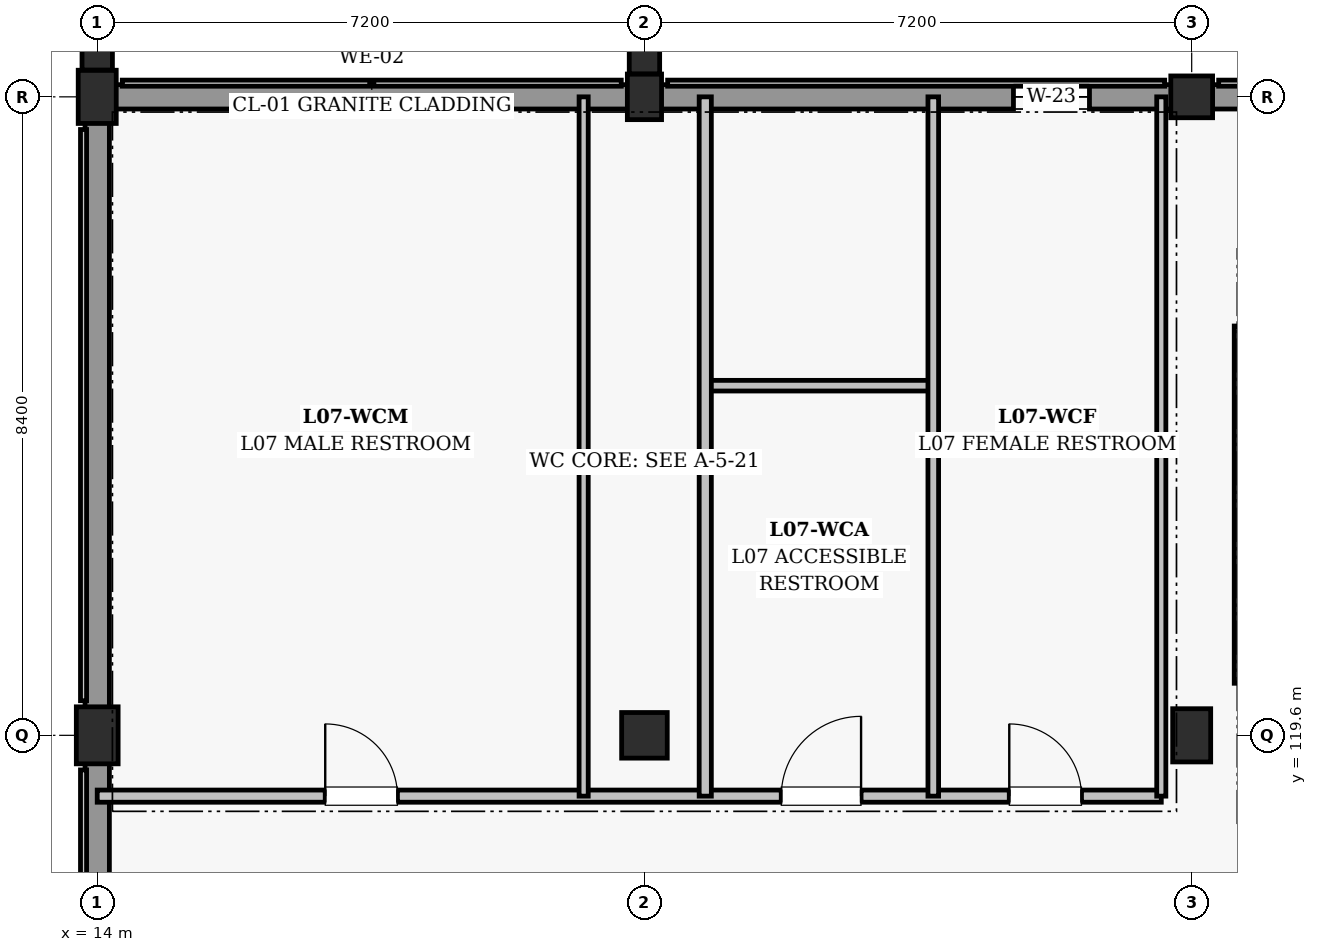
"""IFC4 building model, lengths in metres.
Left out: names, types, materials, properties, quantities, classifications, styles, units other than length and angle.
Written with IfcOpenShell. Run it as: python <this file> out.ifc"""

import sys

from ifc_helpers import new_model, si_unit, direction, frame, frame_2d, origin, origin_2d, place, context, subcontext, project, spatial, rectangle, extrude, element, fill, save


model = new_model("IFC4")
c1 = context("Model", 3, precision=1e-05, world=origin(), true_north=direction((0.0, 1.0)))
c2 = subcontext(c1, "Body", "Model", "MODEL_VIEW")
j1 = project(units=[si_unit("LENGTHUNIT", "METRE"), si_unit("PLANEANGLEUNIT", "RADIAN")], contexts=[c1])
p1 = place(None, origin())
s1 = spatial("IfcSite", under=j1, at=p1, CompositionType="ELEMENT")
p2 = place(p1, origin())
s2 = spatial("IfcBuilding", under=s1, at=p2, CompositionType="ELEMENT")
p3 = place(p2, frame((0.0, 0.0, 32.4)))
s3 = spatial("IfcBuildingStorey", under=s2, at=p3, CompositionType="ELEMENT", Elevation=32.4)
p4 = place(p3, frame((14.0, 119.6, 0.0), z_axis=(0.0, 0.0, 1.0), x_axis=(1.0, 0.0, 0.0)))
e1 = element("IfcColumn", 1, at=p4, inside=s3, PredefinedType="COLUMN", context=c2, shape_type="SweptSolid", body=[
    extrude(rectangle(XDim=0.55, YDim=0.75, at=origin_2d()), origin(), (0.0, 0.0, 1.0), 4.5),
])
p5 = place(p3, frame((14.0, 128.0, 0.0), z_axis=(0.0, 0.0, 1.0), x_axis=(1.0, 0.0, 0.0)))
e2 = element("IfcColumn", 2, at=p5, inside=s3, PredefinedType="COLUMN", context=c2, shape_type="SweptSolid", body=[
    extrude(rectangle(XDim=0.5, YDim=0.7, at=origin_2d()), origin(), (0.0, 0.0, 1.0), 4.5),
])
p6 = place(p3, frame((21.2, 119.6, 0.0), z_axis=(0.0, 0.0, 1.0), x_axis=(1.0, 0.0, 0.0)))
e3 = element("IfcColumn", 3, at=p6, inside=s3, PredefinedType="COLUMN", context=c2, shape_type="SweptSolid", body=[
    extrude(rectangle(XDim=0.6, YDim=0.6, at=origin_2d()), origin(), (0.0, 0.0, 1.0), 4.5),
])
p7 = place(p3, frame((21.2, 128.0, 0.0), z_axis=(0.0, 0.0, 1.0), x_axis=(1.0, 0.0, 0.0)))
e4 = element("IfcColumn", 4, at=p7, inside=s3, PredefinedType="COLUMN", context=c2, shape_type="SweptSolid", body=[
    extrude(rectangle(XDim=0.45, YDim=0.6, at=origin_2d()), origin(), (0.0, 0.0, 1.0), 4.5),
])
p8 = place(p3, frame((28.4, 119.6, 0.0), z_axis=(0.0, 0.0, 1.0), x_axis=(1.0, 0.0, 0.0)))
e5 = element("IfcColumn", 5, at=p8, inside=s3, PredefinedType="COLUMN", context=c2, shape_type="SweptSolid", body=[
    extrude(rectangle(XDim=0.5, YDim=0.7, at=origin_2d()), origin(), (0.0, 0.0, 1.0), 4.5),
])
p9 = place(p3, frame((28.4, 128.0, 0.0), z_axis=(0.0, 0.0, 1.0), x_axis=(1.0, 0.0, 0.0)))
e6 = element("IfcColumn", 6, at=p9, inside=s3, PredefinedType="COLUMN", context=c2, shape_type="SweptSolid", body=[
    extrude(rectangle(XDim=0.55, YDim=0.55, at=origin_2d()), origin(), (0.0, 0.0, 1.0), 4.5),
])
for number, where, z_axis, x_axis in (
    (7, (14.0, 128.653, 0.0), (0.0, 0.0, 1.0), (1.0, 0.0, 0.0)),
    (8, (21.2, 128.603, 0.0), (0.0, 0.0, 1.0), (1.0, 0.0, 0.0)),
):
    element("IfcColumn", number, at=place(p3, frame(where, z_axis=z_axis, x_axis=x_axis)), inside=s3, PredefinedType="PILASTER", context=c2, shape_type="SweptSolid", body=[
        extrude(rectangle(XDim=0.4, YDim=0.6, at=origin_2d()), origin(), (0.0, 0.0, 1.0), 4.5),
    ])
p10 = place(p3, frame((14.23, 128.0, 0.0), z_axis=(0.0, 0.0, 1.0), x_axis=(1.0, 0.0, 0.0)))
e9 = element("IfcWall", 9, at=p10, inside=s3, PredefinedType="SOLIDWALL", context=c2, shape_type="SweptSolid", body=[
    extrude(rectangle(XDim=6.765, YDim=0.32, at=frame_2d((3.383, 0.0))), origin(), (0.0, 0.0, 1.0), 3.305),
])
p11 = place(p3, frame((21.405, 128.0, 0.0), z_axis=(0.0, 0.0, 1.0), x_axis=(1.0, 0.0, 0.0)))
e10 = element("IfcWall", 10, at=p11, inside=s3, PredefinedType="SOLIDWALL", context=c2, shape_type="SweptSolid", body=[
    extrude(rectangle(XDim=6.74, YDim=0.32, at=frame_2d((3.37, 0.0))), origin(), (0.0, 0.0, 1.0), 3.305),
])
p12 = place(p11, frame((4.65, 0.0, 1.85)))
e11 = element("IfcOpeningElement", 11, at=p12, cuts=e10, PredefinedType="OPENING", context=c2, shape_type="SweptSolid", body=[
    extrude(rectangle(XDim=1.0, YDim=0.95, at=frame_2d((0.5, 0.475))), frame((0.0, 0.17, 0.0), z_axis=(0.0, -1.0, 0.0), x_axis=(1.0, 0.0, 0.0)), (0.0, 0.0, 1.0), 0.34),
])
p13 = place(p3, frame((28.655, 128.0, 0.0), z_axis=(0.0, 0.0, 1.0), x_axis=(1.0, 0.0, 0.0)))
e12 = element("IfcWall", 12, at=p13, inside=s3, PredefinedType="SOLIDWALL", context=c2, shape_type="SweptSolid", body=[
    extrude(rectangle(XDim=6.69, YDim=0.32, at=frame_2d((3.345, 0.0))), origin(), (0.0, 0.0, 1.0), 3.355),
])
p14 = place(p3, frame((14.0, 111.48, 0.0), z_axis=(0.0, 0.0, 1.0), x_axis=(0.0, 1.0, 0.0)))
e13 = element("IfcWall", 13, at=p14, inside=s3, PredefinedType="SOLIDWALL", context=c2, shape_type="SweptSolid", body=[
    extrude(rectangle(XDim=7.765, YDim=0.32, at=frame_2d((3.883, 0.0))), origin(), (0.0, 0.0, 1.0), 3.405),
])
p15 = place(p3, frame((14.0, 119.955, 0.0), z_axis=(0.0, 0.0, 1.0), x_axis=(0.0, 1.0, 0.0)))
e14 = element("IfcWall", 14, at=p15, inside=s3, PredefinedType="SOLIDWALL", context=c2, shape_type="SweptSolid", body=[
    extrude(rectangle(XDim=7.715, YDim=0.32, at=frame_2d((3.857, 0.0))), origin(), (0.0, 0.0, 1.0), 3.405),
])
p16 = place(p3, frame((29.085, 124.985, 0.0), z_axis=(0.0, 0.0, 1.0), x_axis=(0.0, -1.0, 0.0)))
e15 = element("IfcWall", 15, at=p16, inside=s3, PredefinedType="SHEAR", context=c2, shape_type="SweptSolid", body=[
    extrude(rectangle(XDim=4.7, YDim=0.25, at=frame_2d((2.35, 0.0))), origin(), (0.0, 0.0, 1.0), 4.175),
])
p17 = place(p3, frame((14.0, 118.8, 0.0), z_axis=(0.0, 0.0, 1.0), x_axis=(1.0, 0.0, 0.0)))
e16 = element("IfcWall", 16, at=p17, inside=s3, PredefinedType="PARTITIONING", context=c2, shape_type="SweptSolid", body=[
    extrude(rectangle(XDim=14.0, YDim=0.16, at=frame_2d((7.0, 0.0))), origin(), (0.0, 0.0, 1.0), 3.36),
])
p18 = place(p17, frame((3.0, 0.0, 0.0)))
e17 = element("IfcOpeningElement", 17, at=p18, cuts=e16, PredefinedType="OPENING", context=c2, shape_type="SweptSolid", body=[
    extrude(rectangle(XDim=0.95, YDim=2.15, at=frame_2d((0.475, 1.075))), frame((0.0, 0.09, 0.0), z_axis=(0.0, -1.0, 0.0), x_axis=(1.0, 0.0, 0.0)), (0.0, 0.0, 1.0), 0.18),
])
p19 = place(p17, frame((9.0, 0.0, 0.0)))
e18 = element("IfcOpeningElement", 18, at=p19, cuts=e16, PredefinedType="OPENING", context=c2, shape_type="SweptSolid", body=[
    extrude(rectangle(XDim=1.05, YDim=2.15, at=frame_2d((0.525, 1.075))), frame((0.0, 0.09, 0.0), z_axis=(0.0, -1.0, 0.0), x_axis=(1.0, 0.0, 0.0)), (0.0, 0.0, 1.0), 0.18),
])
p20 = place(p17, frame((12.0, 0.0, 0.0)))
e19 = element("IfcOpeningElement", 19, at=p20, cuts=e16, PredefinedType="OPENING", context=c2, shape_type="SweptSolid", body=[
    extrude(rectangle(XDim=0.95, YDim=2.15, at=frame_2d((0.475, 1.075))), frame((0.0, 0.09, 0.0), z_axis=(0.0, -1.0, 0.0), x_axis=(1.0, 0.0, 0.0)), (0.0, 0.0, 1.0), 0.18),
])
p21 = place(p3, frame((22.0, 124.2, 0.0), z_axis=(0.0, 0.0, 1.0), x_axis=(1.0, 0.0, 0.0)))
e20 = element("IfcWall", 20, at=p21, inside=s3, PredefinedType="PARTITIONING", context=c2, shape_type="SweptSolid", body=[
    extrude(rectangle(XDim=3.0, YDim=0.14, at=frame_2d((1.5, 0.0))), origin(), (0.0, 0.0, 1.0), 3.56),
])
p22 = place(p3, frame((20.4, 118.8, 0.0), z_axis=(0.0, 0.0, 1.0), x_axis=(0.0, 1.0, 0.0)))
e21 = element("IfcWall", 21, at=p22, inside=s3, PredefinedType="PARTITIONING", context=c2, shape_type="SweptSolid", body=[
    extrude(rectangle(XDim=9.2, YDim=0.12, at=frame_2d((4.6, 0.0))), origin(), (0.0, 0.0, 1.0), 3.41),
])
p23 = place(p3, frame((22.0, 118.8, 0.0), z_axis=(0.0, 0.0, 1.0), x_axis=(0.0, 1.0, 0.0)))
e22 = element("IfcWall", 22, at=p23, inside=s3, PredefinedType="PARTITIONING", context=c2, shape_type="SweptSolid", body=[
    extrude(rectangle(XDim=9.2, YDim=0.16, at=frame_2d((4.6, 0.0))), origin(), (0.0, 0.0, 1.0), 3.36),
])
p24 = place(p3, frame((25.0, 118.8, 0.0), z_axis=(0.0, 0.0, 1.0), x_axis=(0.0, 1.0, 0.0)))
e23 = element("IfcWall", 23, at=p24, inside=s3, PredefinedType="PARTITIONING", context=c2, shape_type="SweptSolid", body=[
    extrude(rectangle(XDim=9.2, YDim=0.14, at=frame_2d((4.6, 0.0))), origin(), (0.0, 0.0, 1.0), 3.36),
])
p25 = place(p3, frame((28.0, 118.8, 0.0), z_axis=(0.0, 0.0, 1.0), x_axis=(0.0, 1.0, 0.0)))
e24 = element("IfcWall", 24, at=p25, inside=s3, PredefinedType="PARTITIONING", context=c2, shape_type="SweptSolid", body=[
    extrude(rectangle(XDim=9.2, YDim=0.12, at=frame_2d((4.6, 0.0))), origin(), (0.0, 0.0, 1.0), 3.36),
])
p26 = place(p12, origin())
e25 = element("IfcWindow", 25, at=p26, inside=s3, PartitioningType="SINGLE_PANEL", PredefinedType="WINDOW", context=c2, shape_type="SweptSolid", body=[
    extrude(rectangle(XDim=1.0, YDim=0.95, at=frame_2d((0.5, 0.475))), frame((0.0, 0.03, 0.0), z_axis=(0.0, -1.0, 0.0), x_axis=(1.0, 0.0, 0.0)), (0.0, 0.0, 1.0), 0.06),
])
fill(e11, e25)
p27 = place(p18, origin())
e26 = element("IfcDoor", 26, at=p27, inside=s3, OperationType="SINGLE_SWING_LEFT", PredefinedType="DOOR", context=c2, shape_type="SweptSolid", body=[
    extrude(rectangle(XDim=0.95, YDim=2.15, at=frame_2d((0.475, 1.075))), frame((0.0, 0.025, 0.0), z_axis=(0.0, -1.0, 0.0), x_axis=(1.0, 0.0, 0.0)), (0.0, 0.0, 1.0), 0.05),
])
fill(e17, e26)
p28 = place(p19, origin())
e27 = element("IfcDoor", 27, at=p28, inside=s3, OperationType="SINGLE_SWING_RIGHT", PredefinedType="DOOR", context=c2, shape_type="SweptSolid", body=[
    extrude(rectangle(XDim=1.05, YDim=2.15, at=frame_2d((0.525, 1.075))), frame((0.0, 0.025, 0.0), z_axis=(0.0, -1.0, 0.0), x_axis=(1.0, 0.0, 0.0)), (0.0, 0.0, 1.0), 0.05),
])
fill(e18, e27)
p29 = place(p20, origin())
e28 = element("IfcDoor", 28, at=p29, inside=s3, OperationType="SINGLE_SWING_LEFT", PredefinedType="DOOR", context=c2, shape_type="SweptSolid", body=[
    extrude(rectangle(XDim=0.95, YDim=2.15, at=frame_2d((0.475, 1.075))), frame((0.0, 0.025, 0.0), z_axis=(0.0, -1.0, 0.0), x_axis=(1.0, 0.0, 0.0)), (0.0, 0.0, 1.0), 0.05),
])
fill(e19, e28)
save(model, sys.argv[1])
